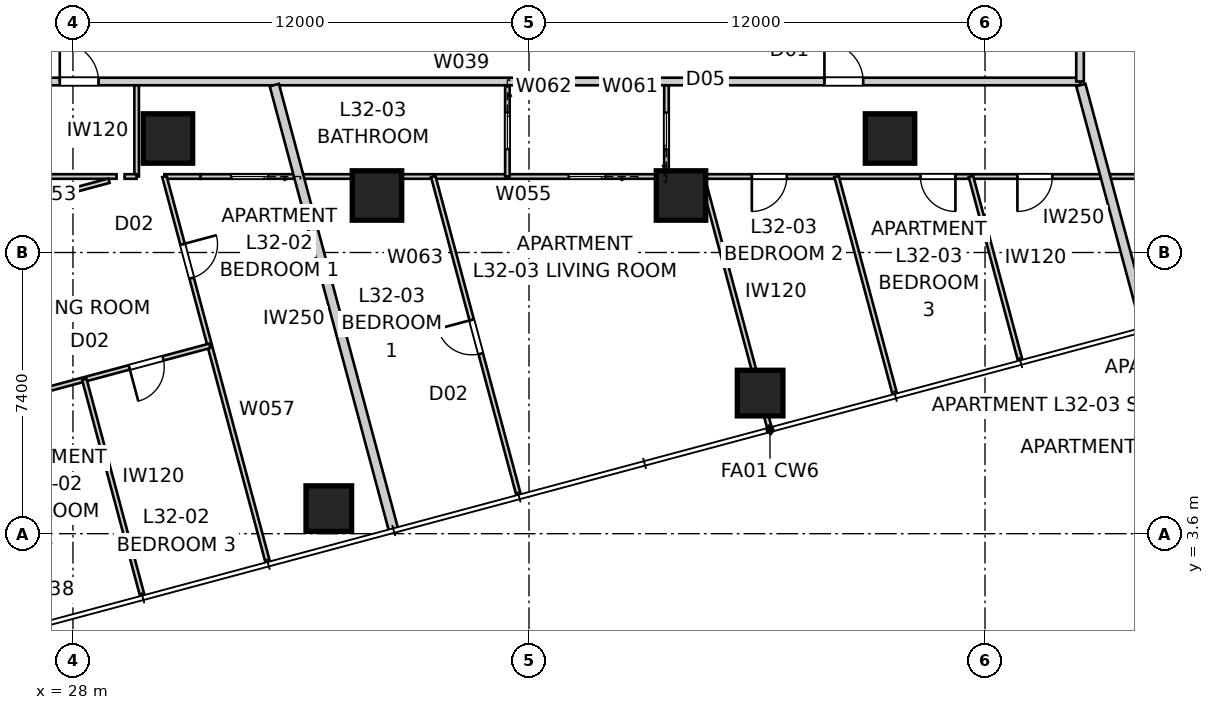
"""IFC4 building model, lengths in metres.
Left out: names, types, materials, properties, quantities, classifications, styles, units other than length and angle.
Written with IfcOpenShell. Run it as: python <this file> out.ifc"""

import sys

from ifc_helpers import new_model, si_unit, direction, frame, frame_2d, origin, origin_2d, place, context, subcontext, project, spatial, rectangle, extrude, element, fill, save


model = new_model("IFC4")
c1 = context("Model", 3, precision=1e-05, world=origin(), true_north=direction((0.0, 1.0)))
c2 = subcontext(c1, "Body", "Model", "MODEL_VIEW")
j1 = project(units=[si_unit("LENGTHUNIT", "METRE"), si_unit("PLANEANGLEUNIT", "RADIAN")], contexts=[c1])
p1 = place(None, origin())
s1 = spatial("IfcSite", under=j1, at=p1, CompositionType="ELEMENT")
p2 = place(p1, origin())
s2 = spatial("IfcBuilding", under=s1, at=p2, CompositionType="ELEMENT")
p3 = place(p2, frame((0.0, 0.0, 118.4)))
s3 = spatial("IfcBuildingStorey", under=s2, at=p3, CompositionType="ELEMENT", Elevation=118.4)
for number, where, z_axis, x_axis in (
    (1, (34.733, 4.26, 0.0), (0.0, 0.0, 1.0), (1.0, 0.0, 0.0)),
    (2, (46.082, 7.301, 0.0), (0.0, 0.0, 1.0), (1.0, 0.0, 0.0)),
):
    element("IfcColumn", number, at=place(p3, frame(where, z_axis=z_axis, x_axis=x_axis)), inside=s3, PredefinedType="COLUMN", context=c2, shape_type="SweptSolid", body=[
        extrude(rectangle(XDim=1.2, YDim=1.2, at=origin_2d()), origin(), (0.0, 0.0, 1.0), 3.4),
    ])
for number, where, z_axis, x_axis in (
    (3, (30.5, 14.0, 0.0), (0.0, 0.0, 1.0), (1.0, 0.0, 0.0)),
    (4, (36.0, 12.5, 0.0), (0.0, 0.0, 1.0), (1.0, 0.0, 0.0)),
    (5, (44.0, 12.5, 0.0), (0.0, 0.0, 1.0), (1.0, 0.0, 0.0)),
    (6, (49.5, 14.0, 0.0), (0.0, 0.0, 1.0), (1.0, 0.0, 0.0)),
):
    element("IfcColumn", number, at=place(p3, frame(where, z_axis=z_axis, x_axis=x_axis)), inside=s3, PredefinedType="COLUMN", context=c2, shape_type="SweptSolid", body=[
        extrude(rectangle(XDim=1.3, YDim=1.3, at=origin_2d()), origin(), (0.0, 0.0, 1.0), 3.4),
    ])
p4 = place(p3, frame((26.3, 15.5, 0.0), z_axis=(0.0, 0.0, 1.0), x_axis=(1.0, 0.0, 0.0)))
e7 = element("IfcWall", 7, at=p4, inside=s3, PredefinedType="PARTITIONING", context=c2, shape_type="SweptSolid", body=[
    extrude(rectangle(XDim=28.2, YDim=0.2, at=frame_2d((14.1, 0.0))), origin(), (0.0, 0.0, 1.0), 3.25),
])
p5 = place(p4, frame((21.474, 0.0, 0.0)))
e8 = element("IfcOpeningElement", 8, at=p5, cuts=e7, PredefinedType="OPENING", context=c2, shape_type="SweptSolid", body=[
    extrude(rectangle(XDim=1.02, YDim=2.34, at=frame_2d((0.51, 1.17))), frame((0.0, 0.11, 0.0), z_axis=(0.0, -1.0, 0.0), x_axis=(1.0, 0.0, 0.0)), (0.0, 0.0, 1.0), 0.22),
])
p6 = place(p4, frame((1.353, 0.0, 0.0)))
e9 = element("IfcOpeningElement", 9, at=p6, cuts=e7, PredefinedType="OPENING", context=c2, shape_type="SweptSolid", body=[
    extrude(rectangle(XDim=1.02, YDim=2.1, at=frame_2d((0.51, 1.05))), frame((0.0, 0.11, 0.0), z_axis=(0.0, -1.0, 0.0), x_axis=(1.0, 0.0, 0.0)), (0.0, 0.0, 1.0), 0.22),
])
p7 = place(p3, frame((54.5, 15.5, 0.0), z_axis=(0.0, 0.0, 1.0), x_axis=(0.0, 1.0, 0.0)))
e10 = element("IfcWall", 10, at=p7, inside=s3, PredefinedType="PARTITIONING", context=c2, shape_type="SweptSolid", body=[
    extrude(rectangle(XDim=29.0, YDim=0.2, at=frame_2d((14.5, 0.0))), origin(), (0.0, 0.0, 1.0), 3.25),
])
p8 = place(p7, frame((24.76, 0.0, 0.0)))
e11 = element("IfcOpeningElement", 11, at=p8, cuts=e10, PredefinedType="OPENING", context=c2, shape_type="SweptSolid", body=[
    extrude(rectangle(XDim=1.02, YDim=2.1, at=frame_2d((0.51, 1.05))), frame((0.0, 0.11, 0.0), z_axis=(0.0, -1.0, 0.0), x_axis=(1.0, 0.0, 0.0)), (0.0, 0.0, 1.0), 0.22),
])
p9 = place(p7, frame((5.829, 0.0, 0.0)))
e12 = element("IfcOpeningElement", 12, at=p9, cuts=e10, PredefinedType="OPENING", context=c2, shape_type="SweptSolid", body=[
    extrude(rectangle(XDim=1.02, YDim=2.34, at=frame_2d((0.51, 1.17))), frame((0.0, 0.11, 0.0), z_axis=(0.0, -1.0, 0.0), x_axis=(1.0, 0.0, 0.0)), (0.0, 0.0, 1.0), 0.22),
])
p10 = place(p7, frame((9.559, 0.0, 0.0)))
e13 = element("IfcOpeningElement", 13, at=p10, cuts=e10, PredefinedType="OPENING", context=c2, shape_type="SweptSolid", body=[
    extrude(rectangle(XDim=1.02, YDim=2.34, at=frame_2d((0.51, 1.17))), frame((0.0, 0.11, 0.0), z_axis=(0.0, -1.0, 0.0), x_axis=(1.0, 0.0, 0.0)), (0.0, 0.0, 1.0), 0.22),
])
p11 = place(p3, frame((36.44, 3.682, 0.0), z_axis=(0.0, 0.0, 1.0), x_axis=(-0.258824223352, 0.965924438766, 0.0)))
e14 = element("IfcWall", 14, at=p11, inside=s3, PredefinedType="PARTITIONING", context=c2, shape_type="SweptSolid", body=[
    extrude(rectangle(XDim=12.138, YDim=0.25, at=frame_2d((6.069, 0.0))), origin(), (0.0, 0.0, 1.0), 3.25),
])
p12 = place(p3, frame((56.242, 8.988, 0.0), z_axis=(0.0, 0.0, 1.0), x_axis=(-0.25880587229, 0.965929355837, 0.0)))
e15 = element("IfcWall", 15, at=p12, inside=s3, PredefinedType="PARTITIONING", context=c2, shape_type="SweptSolid", body=[
    extrude(rectangle(XDim=6.645, YDim=0.25, at=frame_2d((3.322, 0.0))), origin(), (0.0, 0.0, 1.0), 3.25),
])
p13 = place(p3, frame((29.676, 15.4, 0.0), z_axis=(0.0, 0.0, 1.0), x_axis=(0.0, -1.0, 0.0)))
e16 = element("IfcWall", 16, at=p13, inside=s3, PredefinedType="PARTITIONING", context=c2, shape_type="SweptSolid", body=[
    extrude(rectangle(XDim=2.4, YDim=0.12, at=frame_2d((1.2, 0.0))), origin(), (0.0, 0.0, 1.0), 3.25),
])
p14 = place(p3, frame((29.147, 13.0, 0.0), z_axis=(0.0, 0.0, 1.0), x_axis=(-1.0, 0.0, 0.0)))
e17 = element("IfcWall", 17, at=p14, inside=s3, PredefinedType="PARTITIONING", context=c2, shape_type="SweptSolid", body=[
    extrude(rectangle(XDim=6.147, YDim=0.12, at=frame_2d((3.074, 0.0))), origin(), (0.0, 0.0, 1.0), 3.25),
])
p15 = place(p14, frame((3.591, 0.0, 0.0)))
e18 = element("IfcOpeningElement", 18, at=p15, cuts=e17, PredefinedType="OPENING", context=c2, shape_type="SweptSolid", body=[
    extrude(rectangle(XDim=0.96, YDim=2.1, at=frame_2d((0.48, 1.05))), frame((0.0, 0.07, 0.0), z_axis=(0.0, -1.0, 0.0), x_axis=(1.0, 0.0, 0.0)), (0.0, 0.0, 1.0), 0.14),
])
p16 = place(p3, frame((55.046, 13.0, 0.0), z_axis=(0.0, 0.0, 1.0), x_axis=(-1.0, 0.0, 0.0)))
e19 = element("IfcWall", 19, at=p16, inside=s3, PredefinedType="PARTITIONING", context=c2, shape_type="SweptSolid", body=[
    extrude(rectangle(XDim=23.693, YDim=0.12, at=frame_2d((11.846, 0.0))), origin(), (0.0, 0.0, 1.0), 2.55),
])
p17 = place(p16, frame((8.262, 0.0, 0.0)))
e20 = element("IfcOpeningElement", 20, at=p17, cuts=e19, PredefinedType="OPENING", context=c2, shape_type="SweptSolid", body=[
    extrude(rectangle(XDim=0.92, YDim=2.34, at=frame_2d((0.46, 1.17))), frame((0.0, 0.07, 0.0), z_axis=(0.0, -1.0, 0.0), x_axis=(1.0, 0.0, 0.0)), (0.0, 0.0, 1.0), 0.14),
])
p18 = place(p16, frame((3.825, 0.0, 0.0)))
e21 = element("IfcOpeningElement", 21, at=p18, cuts=e19, PredefinedType="OPENING", context=c2, shape_type="SweptSolid", body=[
    extrude(rectangle(XDim=0.92, YDim=2.34, at=frame_2d((0.46, 1.17))), frame((0.0, 0.07, 0.0), z_axis=(0.0, -1.0, 0.0), x_axis=(1.0, 0.0, 0.0)), (0.0, 0.0, 1.0), 0.14),
])
p19 = place(p16, frame((1.274, 0.0, 0.0)))
e22 = element("IfcOpeningElement", 22, at=p19, cuts=e19, PredefinedType="OPENING", context=c2, shape_type="SweptSolid", body=[
    extrude(rectangle(XDim=0.92, YDim=2.34, at=frame_2d((0.46, 1.17))), frame((0.0, 0.07, 0.0), z_axis=(0.0, -1.0, 0.0), x_axis=(1.0, 0.0, 0.0)), (0.0, 0.0, 1.0), 0.14),
])
p20 = place(p16, frame((13.041, 0.0, 0.0)))
e23 = element("IfcOpeningElement", 23, at=p20, cuts=e19, PredefinedType="OPENING", context=c2, shape_type="SweptSolid", body=[
    extrude(rectangle(XDim=0.96, YDim=2.1, at=frame_2d((0.48, 1.05))), frame((0.0, 0.07, 0.0), z_axis=(0.0, -1.0, 0.0), x_axis=(1.0, 0.0, 0.0)), (0.0, 0.0, 1.0), 0.14),
])
p21 = place(p16, frame((21.917, 0.0, 0.0)))
e24 = element("IfcOpeningElement", 24, at=p21, cuts=e19, PredefinedType="OPENING", context=c2, shape_type="SweptSolid", body=[
    extrude(rectangle(XDim=0.96, YDim=2.1, at=frame_2d((0.48, 1.05))), frame((0.0, 0.07, 0.0), z_axis=(0.0, -1.0, 0.0), x_axis=(1.0, 0.0, 0.0)), (0.0, 0.0, 1.0), 0.14),
])
p22 = place(p3, frame((30.406, 13.0, 0.0), z_axis=(0.0, 0.0, 1.0), x_axis=(0.258797552287, -0.965931585015, 0.0)))
e25 = element("IfcWall", 25, at=p22, inside=s3, PredefinedType="PARTITIONING", context=c2, shape_type="SweptSolid", body=[
    extrude(rectangle(XDim=10.522, YDim=0.12, at=frame_2d((5.261, 0.0))), origin(), (0.0, 0.0, 1.0), 2.722),
])
p23 = place(p22, frame((1.846, 0.0, 0.0)))
e26 = element("IfcOpeningElement", 26, at=p23, cuts=e25, PredefinedType="OPENING", context=c2, shape_type="SweptSolid", body=[
    extrude(rectangle(XDim=0.92, YDim=2.34, at=frame_2d((0.46, 1.17))), frame((0.0, 0.07, 0.0), z_axis=(0.0, -1.0, 0.0), x_axis=(1.0, 0.0, 0.0)), (0.0, 0.0, 1.0), 0.14),
])
p24 = place(p3, frame((31.6, 8.544, 0.0), z_axis=(0.0, 0.0, 1.0), x_axis=(-0.965927151587, -0.258814098973, 0.0)))
e27 = element("IfcWall", 27, at=p24, inside=s3, PredefinedType="PARTITIONING", context=c2, shape_type="SweptSolid", body=[
    extrude(rectangle(XDim=10.793, YDim=0.12, at=frame_2d((5.396, 0.0))), origin(), (0.0, 0.0, 1.0), 3.25),
])
p25 = place(p24, frame((6.64, 0.0, 0.0)))
e28 = element("IfcOpeningElement", 28, at=p25, cuts=e27, PredefinedType="OPENING", context=c2, shape_type="SweptSolid", body=[
    extrude(rectangle(XDim=0.92, YDim=2.34, at=frame_2d((0.46, 1.17))), frame((0.0, 0.07, 0.0), z_axis=(0.0, -1.0, 0.0), x_axis=(1.0, 0.0, 0.0)), (0.0, 0.0, 1.0), 0.14),
])
p26 = place(p24, frame((1.273, 0.0, 0.0)))
e29 = element("IfcOpeningElement", 29, at=p26, cuts=e27, PredefinedType="OPENING", context=c2, shape_type="SweptSolid", body=[
    extrude(rectangle(XDim=0.92, YDim=2.34, at=frame_2d((0.46, 1.17))), frame((0.0, 0.07, 0.0), z_axis=(0.0, -1.0, 0.0), x_axis=(1.0, 0.0, 0.0)), (0.0, 0.0, 1.0), 0.14),
])
p27 = place(p3, frame((19.911, 10.468, 0.0), z_axis=(0.0, 0.0, 1.0), x_axis=(0.965927203676, 0.25881390457, 0.0)))
e30 = element("IfcWall", 30, at=p27, inside=s3, PredefinedType="PARTITIONING", context=c2, shape_type="SweptSolid", body=[
    extrude(rectangle(XDim=9.357, YDim=0.12, at=frame_2d((4.678, 0.0))), origin(), (0.0, 0.0, 1.0), 2.638),
])
p28 = place(p27, frame((4.391, 0.0, 0.0)))
e31 = element("IfcOpeningElement", 31, at=p28, cuts=e30, PredefinedType="OPENING", context=c2, shape_type="SweptSolid", body=[
    extrude(rectangle(XDim=0.96, YDim=2.1, at=frame_2d((0.48, 1.05))), frame((0.0, 0.07, 0.0), z_axis=(0.0, -1.0, 0.0), x_axis=(1.0, 0.0, 0.0)), (0.0, 0.0, 1.0), 0.14),
])
p29 = place(p3, frame((28.3, 7.66, 0.0), z_axis=(0.0, 0.0, 1.0), x_axis=(0.25882212607, -0.965925000741, 0.0)))
e32 = element("IfcWall", 32, at=p29, inside=s3, PredefinedType="PARTITIONING", context=c2, shape_type="SweptSolid", body=[
    extrude(rectangle(XDim=5.91, YDim=0.12, at=frame_2d((2.955, 0.0))), origin(), (0.0, 0.0, 1.0), 3.25),
])
p30 = place(p3, frame((43.618, 13.0, 0.0), z_axis=(0.0, 0.0, 1.0), x_axis=(0.0, 1.0, 0.0)))
e33 = element("IfcWall", 33, at=p30, inside=s3, PredefinedType="PARTITIONING", context=c2, shape_type="SweptSolid", body=[
    extrude(rectangle(XDim=2.4, YDim=0.12, at=frame_2d((1.2, 0.0))), origin(), (0.0, 0.0, 1.0), 3.25),
])
p31 = place(p30, frame((0.72, 0.0, 0.0)))
e34 = element("IfcOpeningElement", 34, at=p31, cuts=e33, PredefinedType="OPENING", context=c2, shape_type="SweptSolid", body=[
    extrude(rectangle(XDim=0.96, YDim=2.1, at=frame_2d((0.48, 1.05))), frame((0.0, 0.07, 0.0), z_axis=(0.0, -1.0, 0.0), x_axis=(1.0, 0.0, 0.0)), (0.0, 0.0, 1.0), 0.14),
])
p32 = place(p3, frame((39.432, 15.4, 0.0), z_axis=(0.0, 0.0, 1.0), x_axis=(0.0, -1.0, 0.0)))
e35 = element("IfcWall", 35, at=p32, inside=s3, PredefinedType="PARTITIONING", context=c2, shape_type="SweptSolid", body=[
    extrude(rectangle(XDim=2.4, YDim=0.12, at=frame_2d((1.2, 0.0))), origin(), (0.0, 0.0, 1.0), 3.25),
])
p33 = place(p32, frame((0.72, 0.0, 0.0)))
e36 = element("IfcOpeningElement", 36, at=p33, cuts=e35, PredefinedType="OPENING", context=c2, shape_type="SweptSolid", body=[
    extrude(rectangle(XDim=0.96, YDim=2.1, at=frame_2d((0.48, 1.05))), frame((0.0, 0.07, 0.0), z_axis=(0.0, -1.0, 0.0), x_axis=(1.0, 0.0, 0.0)), (0.0, 0.0, 1.0), 0.14),
])
p34 = place(p3, frame((39.73, 4.605, 0.0), z_axis=(0.0, 0.0, 1.0), x_axis=(-0.258819860698, 0.965925607751, 0.0)))
e37 = element("IfcWall", 37, at=p34, inside=s3, PredefinedType="PARTITIONING", context=c2, shape_type="SweptSolid", body=[
    extrude(rectangle(XDim=8.691, YDim=0.12, at=frame_2d((4.346, 0.0))), origin(), (0.0, 0.0, 1.0), 3.25),
])
p35 = place(p34, frame((3.866, 0.0, 0.0)))
e38 = element("IfcOpeningElement", 38, at=p35, cuts=e37, PredefinedType="OPENING", context=c2, shape_type="SweptSolid", body=[
    extrude(rectangle(XDim=0.92, YDim=2.34, at=frame_2d((0.46, 1.17))), frame((0.0, 0.07, 0.0), z_axis=(0.0, -1.0, 0.0), x_axis=(1.0, 0.0, 0.0)), (0.0, 0.0, 1.0), 0.14),
])
p36 = place(p3, frame((44.555, 13.0, 0.0), z_axis=(0.0, 0.0, 1.0), x_axis=(0.258829770556, -0.965922952349, 0.0)))
e39 = element("IfcWall", 39, at=p36, inside=s3, PredefinedType="PARTITIONING", context=c2, shape_type="SweptSolid", body=[
    extrude(rectangle(XDim=6.86, YDim=0.12, at=frame_2d((3.43, 0.0))), origin(), (0.0, 0.0, 1.0), 3.25),
])
p37 = place(p3, frame((48.092, 13.0, 0.0), z_axis=(0.0, 0.0, 1.0), x_axis=(0.258812722515, -0.965927520399, 0.0)))
e40 = element("IfcWall", 40, at=p37, inside=s3, PredefinedType="PARTITIONING", context=c2, shape_type="SweptSolid", body=[
    extrude(rectangle(XDim=5.945, YDim=0.12, at=frame_2d((2.972, 0.0))), origin(), (0.0, 0.0, 1.0), 3.25),
])
p38 = place(p3, frame((51.63, 13.0, 0.0), z_axis=(0.0, 0.0, 1.0), x_axis=(0.258789467631, -0.965933751063, 0.0)))
e41 = element("IfcWall", 41, at=p38, inside=s3, PredefinedType="PARTITIONING", context=c2, shape_type="SweptSolid", body=[
    extrude(rectangle(XDim=5.029, YDim=0.12, at=frame_2d((2.515, 0.0))), origin(), (0.0, 0.0, 1.0), 3.25),
])
p39 = place(p3, frame((57.0, 13.0, 0.0), z_axis=(0.0, 0.0, 1.0), x_axis=(-1.0, 0.0, 0.0)))
e42 = element("IfcWall", 42, at=p39, inside=s3, PredefinedType="PARTITIONING", context=c2, shape_type="SweptSolid", body=[
    extrude(rectangle(XDim=1.833, YDim=0.12, at=frame_2d((0.917, 0.0))), origin(), (0.0, 0.0, 1.0), 3.25),
])
p40 = place(p3, frame((29.676, 13.0, 0.0), z_axis=(0.0, 0.0, 1.0), x_axis=(-1.0, 0.0, 0.0)))
e43 = element("IfcWall", 43, at=p40, inside=s3, PredefinedType="PARTITIONING", context=c2, shape_type="SweptSolid", body=[
    extrude(rectangle(XDim=0.317, YDim=0.12, at=frame_2d((0.158, 0.0))), origin(), (0.0, 0.0, 1.0), 3.25),
])
p41 = place(p3, frame((31.354, 13.0, 0.0), z_axis=(0.0, 0.0, 1.0), x_axis=(-1.0, 0.0, 0.0)))
e44 = element("IfcWall", 44, at=p41, inside=s3, PredefinedType="PARTITIONING", context=c2, shape_type="SweptSolid", body=[
    extrude(rectangle(XDim=0.947, YDim=0.12, at=frame_2d((0.474, 0.0))), origin(), (0.0, 0.0, 1.0), 3.25),
])
p42 = place(p5, origin())
e45 = element("IfcDoor", 45, at=p42, inside=s3, OperationType="SINGLE_SWING_LEFT", PredefinedType="DOOR", context=c2, shape_type="SweptSolid", body=[
    extrude(rectangle(XDim=1.02, YDim=2.34, at=frame_2d((0.51, 1.17))), frame((0.0, 0.025, 0.0), z_axis=(0.0, -1.0, 0.0), x_axis=(1.0, 0.0, 0.0)), (0.0, 0.0, 1.0), 0.05),
])
fill(e8, e45)
p43 = place(p6, origin())
e46 = element("IfcDoor", 46, at=p43, inside=s3, OperationType="SINGLE_SWING_LEFT", PredefinedType="DOOR", context=c2, shape_type="SweptSolid", body=[
    extrude(rectangle(XDim=1.02, YDim=2.1, at=frame_2d((0.51, 1.05))), frame((0.0, 0.025, 0.0), z_axis=(0.0, -1.0, 0.0), x_axis=(1.0, 0.0, 0.0)), (0.0, 0.0, 1.0), 0.05),
])
fill(e9, e46)
p44 = place(p17, origin())
e47 = element("IfcDoor", 47, at=p44, inside=s3, OperationType="SINGLE_SWING_RIGHT", PredefinedType="DOOR", context=c2, shape_type="SweptSolid", body=[
    extrude(rectangle(XDim=0.92, YDim=2.34, at=frame_2d((0.46, 1.17))), frame((0.0, 0.025, 0.0), z_axis=(0.0, -1.0, 0.0), x_axis=(1.0, 0.0, 0.0)), (0.0, 0.0, 1.0), 0.05),
])
fill(e20, e47)
p45 = place(p18, origin())
e48 = element("IfcDoor", 48, at=p45, inside=s3, OperationType="SINGLE_SWING_LEFT", PredefinedType="DOOR", context=c2, shape_type="SweptSolid", body=[
    extrude(rectangle(XDim=0.92, YDim=2.34, at=frame_2d((0.46, 1.17))), frame((0.0, 0.025, 0.0), z_axis=(0.0, -1.0, 0.0), x_axis=(1.0, 0.0, 0.0)), (0.0, 0.0, 1.0), 0.05),
])
fill(e21, e48)
p46 = place(p19, origin())
e49 = element("IfcDoor", 49, at=p46, inside=s3, OperationType="SINGLE_SWING_RIGHT", PredefinedType="DOOR", context=c2, shape_type="SweptSolid", body=[
    extrude(rectangle(XDim=0.92, YDim=2.34, at=frame_2d((0.46, 1.17))), frame((0.0, 0.025, 0.0), z_axis=(0.0, -1.0, 0.0), x_axis=(1.0, 0.0, 0.0)), (0.0, 0.0, 1.0), 0.05),
])
fill(e22, e49)
p47 = place(p31, origin())
e50 = element("IfcDoor", 50, at=p47, inside=s3, OperationType="SLIDING_TO_LEFT", PredefinedType="DOOR", context=c2, shape_type="SweptSolid", body=[
    extrude(rectangle(XDim=0.96, YDim=2.1, at=frame_2d((0.48, 1.05))), frame((0.0, 0.025, 0.0), z_axis=(0.0, -1.0, 0.0), x_axis=(1.0, 0.0, 0.0)), (0.0, 0.0, 1.0), 0.05),
])
fill(e34, e50)
p48 = place(p20, origin())
e51 = element("IfcDoor", 51, at=p48, inside=s3, OperationType="SLIDING_TO_LEFT", PredefinedType="DOOR", context=c2, shape_type="SweptSolid", body=[
    extrude(rectangle(XDim=0.96, YDim=2.1, at=frame_2d((0.48, 1.05))), frame((0.0, 0.025, 0.0), z_axis=(0.0, -1.0, 0.0), x_axis=(1.0, 0.0, 0.0)), (0.0, 0.0, 1.0), 0.05),
])
fill(e23, e51)
p49 = place(p33, origin())
e52 = element("IfcDoor", 52, at=p49, inside=s3, OperationType="SLIDING_TO_LEFT", PredefinedType="DOOR", context=c2, shape_type="SweptSolid", body=[
    extrude(rectangle(XDim=0.96, YDim=2.1, at=frame_2d((0.48, 1.05))), frame((0.0, 0.025, 0.0), z_axis=(0.0, -1.0, 0.0), x_axis=(1.0, 0.0, 0.0)), (0.0, 0.0, 1.0), 0.05),
])
fill(e36, e52)
p50 = place(p35, origin())
e53 = element("IfcDoor", 53, at=p50, inside=s3, OperationType="SINGLE_SWING_RIGHT", PredefinedType="DOOR", context=c2, shape_type="SweptSolid", body=[
    extrude(rectangle(XDim=0.92, YDim=2.34, at=frame_2d((0.46, 1.17))), frame((0.0, 0.025, 0.0), z_axis=(0.0, -1.0, 0.0), x_axis=(1.0, 0.0, 0.0)), (0.0, 0.0, 1.0), 0.05),
])
fill(e38, e53)
p51 = place(p23, origin())
e54 = element("IfcDoor", 54, at=p51, inside=s3, OperationType="SINGLE_SWING_LEFT", PredefinedType="DOOR", context=c2, shape_type="SweptSolid", body=[
    extrude(rectangle(XDim=0.92, YDim=2.34, at=frame_2d((0.46, 1.17))), frame((0.0, 0.025, 0.0), z_axis=(0.0, -1.0, 0.0), x_axis=(1.0, 0.0, 0.0)), (0.0, 0.0, 1.0), 0.05),
])
fill(e26, e54)
p52 = place(p26, origin())
e55 = element("IfcDoor", 55, at=p52, inside=s3, OperationType="SINGLE_SWING_RIGHT", PredefinedType="DOOR", context=c2, shape_type="SweptSolid", body=[
    extrude(rectangle(XDim=0.92, YDim=2.34, at=frame_2d((0.46, 1.17))), frame((0.0, 0.025, 0.0), z_axis=(0.0, -1.0, 0.0), x_axis=(1.0, 0.0, 0.0)), (0.0, 0.0, 1.0), 0.05),
])
fill(e29, e55)
p53 = place(p21, origin())
e56 = element("IfcDoor", 56, at=p53, inside=s3, OperationType="SLIDING_TO_LEFT", PredefinedType="DOOR", context=c2, shape_type="SweptSolid", body=[
    extrude(rectangle(XDim=0.96, YDim=2.1, at=frame_2d((0.48, 1.05))), frame((0.0, 0.025, 0.0), z_axis=(0.0, -1.0, 0.0), x_axis=(1.0, 0.0, 0.0)), (0.0, 0.0, 1.0), 0.05),
])
fill(e24, e56)
save(model, sys.argv[1])
